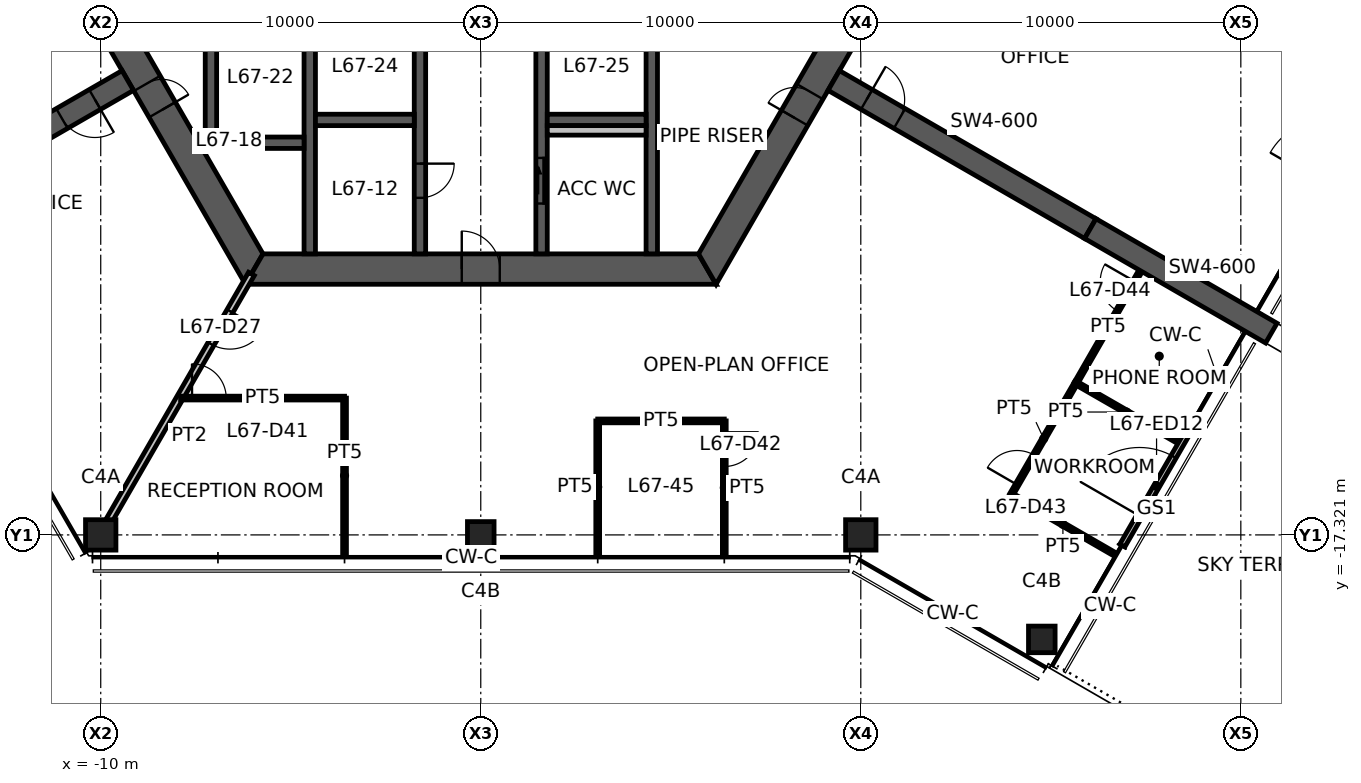
"""IFC4 building model, lengths in metres.
Left out: names, types, materials, properties, quantities, classifications, styles, units other than length and angle.
Written with IfcOpenShell. Run it as: python <this file> out.ifc"""

import sys

from ifc_helpers import new_model, si_unit, direction, frame, frame_2d, origin, origin_2d, place, context, subcontext, project, spatial, polyline, rectangle, hollow_rectangle, outline, extrude, element, fill, save


model = new_model("IFC4")
c1 = context("Model", 3, precision=1e-05, world=origin(), true_north=direction((0.0, 1.0)))
c2 = subcontext(c1, "Body", "Model", "MODEL_VIEW")
j1 = project(units=[si_unit("LENGTHUNIT", "METRE"), si_unit("PLANEANGLEUNIT", "RADIAN")], contexts=[c1])
p1 = place(None, origin())
s1 = spatial("IfcSite", under=j1, at=p1, CompositionType="ELEMENT")
p2 = place(p1, origin())
s2 = spatial("IfcBuilding", under=s1, at=p2, CompositionType="ELEMENT")
p3 = place(p2, frame((0.0, 0.0, 267.4)))
s3 = spatial("IfcBuildingStorey", under=s2, at=p3, CompositionType="ELEMENT", Elevation=267.4)
for number, where, z_axis, x_axis in (
    (1, (-10.0, -17.321, 0.0), (0.0, 0.0, 1.0), (1.0, 0.0, 0.0)),
    (2, (10.0, -17.321, 0.0), (0.0, 0.0, 1.0), (1.0, 0.0, 0.0)),
):
    element("IfcColumn", number, at=place(p3, frame(where, z_axis=z_axis, x_axis=x_axis)), inside=s3, PredefinedType="COLUMN", context=c2, shape_type="SweptSolid", body=[
        extrude(hollow_rectangle(XDim=0.8, YDim=0.8, WallThickness=0.04, at=origin_2d()), origin(), (0.0, 0.0, 1.0), 3.9),
    ])
for number, where, z_axis, x_axis in (
    (3, (0.0, -17.321, 0.0), (0.0, 0.0, 1.0), (1.0, 0.0, 0.0)),
    (4, (14.763, -20.071, 0.0), (0.0, 0.0, 1.0), (1.0, 0.0, 0.0)),
):
    element("IfcColumn", number, at=place(p3, frame(where, z_axis=z_axis, x_axis=x_axis)), inside=s3, PredefinedType="COLUMN", context=c2, shape_type="SweptSolid", body=[
        extrude(hollow_rectangle(XDim=0.7, YDim=0.7, WallThickness=0.032, at=origin_2d()), origin(), (0.0, 0.0, 1.0), 3.9),
    ])
p4 = place(p3, frame((-11.922, 0.0, 0.0), z_axis=(0.0, 0.0, 1.0), x_axis=(0.500004296715, -0.866022923061, 0.0)))
e5 = element("IfcWall", 5, at=p4, inside=s3, PredefinedType="SHEAR", context=c2, shape_type="SweptSolid", body=[
    extrude(outline(polyline([(-0.231, -0.4), (6.281, -0.4), (7.081, -0.4), (12.153, -0.4), (11.691, 0.4), (7.081, 0.4), (6.281, 0.4), (0.231, 0.4), (-0.231, -0.4)])), origin(), (0.0, 0.0, 1.0), 3.9),
])
p5 = place(p4, frame((6.281, 0.0, 0.0)))
e6 = element("IfcOpeningElement", 6, at=p5, cuts=e5, PredefinedType="OPENING", context=c2, shape_type="SweptSolid", body=[
    extrude(rectangle(XDim=0.8, YDim=2.1, at=frame_2d((0.4, 1.05))), frame((0.0, 0.41, 0.0), z_axis=(0.0, -1.0, 0.0), x_axis=(1.0, 0.0, 0.0)), (0.0, 0.0, 1.0), 0.82),
])
p6 = place(p3, frame((-5.961, -10.325, 0.0), z_axis=(0.0, 0.0, 1.0), x_axis=(1.0, 0.0, 0.0)))
e7 = element("IfcWall", 7, at=p6, inside=s3, PredefinedType="SHEAR", context=c2, shape_type="SweptSolid", body=[
    extrude(outline(polyline([(-0.231, -0.4), (5.461, -0.4), (6.461, -0.4), (12.153, -0.4), (11.691, 0.4), (6.461, 0.4), (5.461, 0.4), (0.231, 0.4), (-0.231, -0.4)])), origin(), (0.0, 0.0, 1.0), 3.9),
])
p7 = place(p6, frame((5.461, 0.0, 0.0)))
e8 = element("IfcOpeningElement", 8, at=p7, cuts=e7, PredefinedType="OPENING", context=c2, shape_type="SweptSolid", body=[
    extrude(rectangle(XDim=1.0, YDim=2.1, at=frame_2d((0.5, 1.05))), frame((0.0, 0.41, 0.0), z_axis=(0.0, -1.0, 0.0), x_axis=(1.0, 0.0, 0.0)), (0.0, 0.0, 1.0), 0.82),
])
p8 = place(p3, frame((5.961, -10.325, 0.0), z_axis=(0.0, 0.0, 1.0), x_axis=(0.500004296715, 0.866022923061, 0.0)))
e9 = element("IfcWall", 9, at=p8, inside=s3, PredefinedType="SHEAR", context=c2, shape_type="SweptSolid", body=[
    extrude(outline(polyline([(-0.231, -0.4), (4.594, -0.4), (5.394, -0.4), (12.153, -0.4), (11.691, 0.4), (5.394, 0.4), (4.594, 0.4), (0.231, 0.4), (-0.231, -0.4)])), origin(), (0.0, 0.0, 1.0), 3.9),
])
p9 = place(p8, frame((4.594, 0.0, 0.0)))
e10 = element("IfcOpeningElement", 10, at=p9, cuts=e9, PredefinedType="OPENING", context=c2, shape_type="SweptSolid", body=[
    extrude(rectangle(XDim=0.8, YDim=2.1, at=frame_2d((0.4, 1.05))), frame((0.0, 0.41, 0.0), z_axis=(0.0, -1.0, 0.0), x_axis=(1.0, 0.0, 0.0)), (0.0, 0.0, 1.0), 0.82),
])
p10 = place(p3, frame((-9.288, -5.363, 0.0), z_axis=(0.0, 0.0, 1.0), x_axis=(-0.866027473358, -0.499996415376, 0.0)))
e11 = element("IfcWall", 11, at=p10, inside=s3, PredefinedType="SHEAR", context=c2, shape_type="SweptSolid", body=[
    extrude(rectangle(XDim=7.045, YDim=0.6, at=frame_2d((3.523, 0.0))), origin(), (0.0, 0.0, 1.0), 3.9),
])
p11 = place(p10, frame((1.0, 0.0, 0.0)))
e12 = element("IfcOpeningElement", 12, at=p11, cuts=e11, PredefinedType="OPENING", context=c2, shape_type="SweptSolid", body=[
    extrude(rectangle(XDim=1.0, YDim=2.1, at=frame_2d((0.5, 1.05))), frame((0.0, 0.31, 0.0), z_axis=(0.0, -1.0, 0.0), x_axis=(1.0, 0.0, 0.0)), (0.0, 0.0, 1.0), 0.62),
])
p12 = place(p3, frame((9.288, -5.363, 0.0), z_axis=(0.0, 0.0, 1.0), x_axis=(0.866031736626, -0.499989031036, 0.0)))
e13 = element("IfcWall", 13, at=p12, inside=s3, PredefinedType="SHEAR", context=c2, shape_type="SweptSolid", body=[
    extrude(rectangle(XDim=7.796, YDim=0.6, at=frame_2d((3.898, 0.0))), origin(), (0.0, 0.0, 1.0), 3.9),
])
p13 = place(p12, frame((1.0, 0.0, 0.0)))
e14 = element("IfcOpeningElement", 14, at=p13, cuts=e13, PredefinedType="OPENING", context=c2, shape_type="SweptSolid", body=[
    extrude(rectangle(XDim=1.0, YDim=2.1, at=frame_2d((0.5, 1.05))), frame((0.0, 0.31, 0.0), z_axis=(0.0, -1.0, 0.0), x_axis=(1.0, 0.0, 0.0)), (0.0, 0.0, 1.0), 0.62),
])
p14 = place(p3, frame((16.039, -9.26, 0.0), z_axis=(0.0, 0.0, 1.0), x_axis=(0.866027397988, -0.499996545922, 0.0)))
e15 = element("IfcWall", 15, at=p14, inside=s3, PredefinedType="SHEAR", context=c2, shape_type="SweptSolid", body=[
    extrude(rectangle(XDim=5.5, YDim=0.6, at=frame_2d((2.75, 0.0))), origin(), (0.0, 0.0, 1.0), 3.9),
])
p15 = place(p3, frame((16.883, -17.599, 0.0), z_axis=(0.0, 0.0, 1.0), x_axis=(0.500012057535, 0.866018442252, 0.0)))
e16 = element("IfcWall", 16, at=p15, inside=s3, PredefinedType="STANDARD", context=c2, shape_type="SweptSolid", body=[
    extrude(rectangle(XDim=3.6, YDim=0.15, at=frame_2d((1.8, 0.0))), origin(), (0.0, 0.0, 1.0), 3.9),
])
p16 = place(p15, frame((0.9, 0.0, 0.0)))
e17 = element("IfcOpeningElement", 17, at=p16, cuts=e16, PredefinedType="OPENING", context=c2, shape_type="SweptSolid", body=[
    extrude(rectangle(XDim=1.8, YDim=2.1, at=frame_2d((0.9, 1.05))), frame((0.0, 0.085, 0.0), z_axis=(0.0, -1.0, 0.0), x_axis=(1.0, 0.0, 0.0)), (0.0, 0.0, 1.0), 0.17),
])
p17 = place(p3, frame((-1.6, -3.75, 0.0), z_axis=(0.0, 0.0, 1.0), x_axis=(0.0, -1.0, 0.0)))
e18 = element("IfcWall", 18, at=p17, inside=s3, PredefinedType="SHEAR", context=c2, shape_type="SweptSolid", body=[
    extrude(rectangle(XDim=6.175, YDim=0.3, at=frame_2d((3.087, 0.0))), origin(), (0.0, 0.0, 1.0), 3.9),
])
p18 = place(p17, frame((3.8, 0.0, 0.0)))
e19 = element("IfcOpeningElement", 19, at=p18, cuts=e18, PredefinedType="OPENING", context=c2, shape_type="SweptSolid", body=[
    extrude(rectangle(XDim=0.9, YDim=2.1, at=frame_2d((0.45, 1.05))), frame((0.0, 0.16, 0.0), z_axis=(0.0, -1.0, 0.0), x_axis=(1.0, 0.0, 0.0)), (0.0, 0.0, 1.0), 0.32),
])
p19 = place(p3, frame((1.6, -3.75, 0.0), z_axis=(0.0, 0.0, 1.0), x_axis=(0.0, -1.0, 0.0)))
e20 = element("IfcWall", 20, at=p19, inside=s3, PredefinedType="SHEAR", context=c2, shape_type="SweptSolid", body=[
    extrude(rectangle(XDim=6.175, YDim=0.3, at=frame_2d((3.087, 0.0))), origin(), (0.0, 0.0, 1.0), 3.9),
])
p20 = place(p19, frame((3.65, 0.0, 0.0)))
e21 = element("IfcOpeningElement", 21, at=p20, cuts=e20, PredefinedType="OPENING", context=c2, shape_type="SweptSolid", body=[
    extrude(rectangle(XDim=1.2, YDim=2.1, at=frame_2d((0.6, 1.05))), frame((0.0, 0.16, 0.0), z_axis=(0.0, -1.0, 0.0), x_axis=(1.0, 0.0, 0.0)), (0.0, 0.0, 1.0), 0.32),
])
for number, where, z_axis, x_axis in (
    (22, (-4.5, -3.75, 0.0), (0.0, 0.0, 1.0), (0.0, -1.0, 0.0)),
    (23, (4.5, -3.75, 0.0), (0.0, 0.0, 1.0), (0.0, -1.0, 0.0)),
):
    element("IfcWall", number, at=place(p3, frame(where, z_axis=z_axis, x_axis=x_axis)), inside=s3, PredefinedType="SHEAR", context=c2, shape_type="SweptSolid", body=[
        extrude(rectangle(XDim=6.175, YDim=0.3, at=frame_2d((3.087, 0.0))), origin(), (0.0, 0.0, 1.0), 3.9),
    ])
for number, where, z_axis, x_axis in (
    (24, (-4.35, -6.4, 0.0), (0.0, 0.0, 1.0), (1.0, 0.0, 0.0)),
    (25, (1.75, -6.4, 0.0), (0.0, 0.0, 1.0), (1.0, 0.0, 0.0)),
    (26, (-7.25, -7.0, 0.0), (0.0, 0.0, 1.0), (1.0, 0.0, 0.0)),
):
    element("IfcWall", number, at=place(p3, frame(where, z_axis=z_axis, x_axis=x_axis)), inside=s3, PredefinedType="SHEAR", context=c2, shape_type="SweptSolid", body=[
        extrude(rectangle(XDim=2.6, YDim=0.3, at=frame_2d((1.3, 0.0))), origin(), (0.0, 0.0, 1.0), 3.9),
    ])
p21 = place(p3, frame((-7.1, -3.75, 0.0), z_axis=(0.0, 0.0, 1.0), x_axis=(0.0, -1.0, 0.0)))
e27 = element("IfcWall", 27, at=p21, inside=s3, PredefinedType="SHEAR", context=c2, shape_type="SweptSolid", body=[
    extrude(rectangle(XDim=3.1, YDim=0.3, at=frame_2d((1.55, 0.0))), origin(), (0.0, 0.0, 1.0), 3.9),
])
p22 = place(p3, frame((1.75, -6.675, 0.0), z_axis=(0.0, 0.0, 1.0), x_axis=(1.0, 0.0, 0.0)))
e28 = element("IfcWall", 28, at=p22, inside=s3, PredefinedType="PLUMBINGWALL", context=c2, shape_type="SweptSolid", body=[
    extrude(rectangle(XDim=2.6, YDim=0.25, at=frame_2d((1.3, 0.0))), origin(), (0.0, 0.0, 1.0), 3.9),
])
p23 = place(p3, frame((-6.035, -10.453, 0.0), z_axis=(0.0, 0.0, 1.0), x_axis=(-0.499989830942, -0.866031274813, 0.0)))
e29 = element("IfcWall", 29, at=p23, inside=s3, PredefinedType="PARTITIONING", context=c2, shape_type="SweptSolid", body=[
    extrude(rectangle(XDim=7.93, YDim=0.175, at=frame_2d((3.965, 0.0))), origin(), (0.0, 0.0, 1.0), 3.05),
])
p24 = place(p23, frame((1.13, 0.0, 0.0)))
e30 = element("IfcOpeningElement", 30, at=p24, cuts=e29, PredefinedType="OPENING", context=c2, shape_type="SweptSolid", body=[
    extrude(rectangle(XDim=1.0, YDim=2.1, at=frame_2d((0.5, 1.05))), frame((0.0, 0.098, 0.0), z_axis=(0.0, -1.0, 0.0), x_axis=(1.0, 0.0, 0.0)), (0.0, 0.0, 1.0), 0.195),
])
p25 = place(p3, frame((-7.898, -13.719, 0.0), z_axis=(0.0, 0.0, 1.0), x_axis=(0.999999974372, -0.000226398002, 0.0)))
e31 = element("IfcWall", 31, at=p25, inside=s3, PredefinedType="PARTITIONING", context=c2, shape_type="SweptSolid", body=[
    extrude(rectangle(XDim=4.313, YDim=0.1, at=frame_2d((2.157, 0.0))), origin(), (0.0, 0.0, 1.0), 2.95),
])
p26 = place(p25, frame((0.3, 0.0, 0.0)))
e32 = element("IfcOpeningElement", 32, at=p26, cuts=e31, PredefinedType="OPENING", context=c2, shape_type="SweptSolid", body=[
    extrude(rectangle(XDim=0.9, YDim=2.1, at=frame_2d((0.45, 1.05))), frame((0.0, 0.06, 0.0), z_axis=(0.0, -1.0, 0.0), x_axis=(1.0, 0.0, 0.0)), (0.0, 0.0, 1.0), 0.12),
])
p27 = place(p3, frame((-3.584, -13.72, 0.0), z_axis=(0.0, 0.0, 1.0), x_axis=(0.0, -1.0, 0.0)))
e33 = element("IfcWall", 33, at=p27, inside=s3, PredefinedType="PARTITIONING", context=c2, shape_type="SweptSolid", body=[
    extrude(rectangle(XDim=4.08, YDim=0.1, at=frame_2d((2.04, 0.0))), origin(), (0.0, 0.0, 1.0), 2.95),
])
p28 = place(p3, frame((3.077, -17.801, 0.0), z_axis=(0.0, 0.0, 1.0), x_axis=(0.0, 1.0, 0.0)))
e34 = element("IfcWall", 34, at=p28, inside=s3, PredefinedType="PARTITIONING", context=c2, shape_type="SweptSolid", body=[
    extrude(rectangle(XDim=3.48, YDim=0.1, at=frame_2d((1.74, 0.0))), origin(), (0.0, 0.0, 1.0), 2.95),
])
p29 = place(p3, frame((3.077, -14.321, 0.0), z_axis=(0.0, 0.0, 1.0), x_axis=(1.0, 0.0, 0.0)))
e35 = element("IfcWall", 35, at=p29, inside=s3, PredefinedType="PARTITIONING", context=c2, shape_type="SweptSolid", body=[
    extrude(rectangle(XDim=3.331, YDim=0.1, at=frame_2d((1.666, 0.0))), origin(), (0.0, 0.0, 1.0), 2.95),
])
p30 = place(p3, frame((6.408, -14.321, 0.0), z_axis=(0.0, 0.0, 1.0), x_axis=(0.0, -1.0, 0.0)))
e36 = element("IfcWall", 36, at=p30, inside=s3, PredefinedType="PARTITIONING", context=c2, shape_type="SweptSolid", body=[
    extrude(rectangle(XDim=3.515, YDim=0.1, at=frame_2d((1.757, 0.0))), origin(), (0.0, 0.0, 1.0), 2.95),
])
p31 = place(p30, frame((0.3, 0.0, 0.0)))
e37 = element("IfcOpeningElement", 37, at=p31, cuts=e36, PredefinedType="OPENING", context=c2, shape_type="SweptSolid", body=[
    extrude(rectangle(XDim=0.9, YDim=2.1, at=frame_2d((0.45, 1.05))), frame((0.0, 0.06, 0.0), z_axis=(0.0, -1.0, 0.0), x_axis=(1.0, 0.0, 0.0)), (0.0, 0.0, 1.0), 0.12),
])
p32 = place(p3, frame((15.659, -13.319, 0.0), z_axis=(0.0, 0.0, 1.0), x_axis=(0.866844641549, -0.498578346319, 0.0)))
e38 = element("IfcWall", 38, at=p32, inside=s3, PredefinedType="PARTITIONING", context=c2, shape_type="SweptSolid", body=[
    extrude(rectangle(XDim=3.08, YDim=0.1, at=frame_2d((1.54, 0.0))), origin(), (0.0, 0.0, 1.0), 2.95),
])
p33 = place(p3, frame((13.961, -16.259, 0.0), z_axis=(0.0, 0.0, 1.0), x_axis=(0.501149490816, 0.865360727012, 0.0)))
e39 = element("IfcWall", 39, at=p33, inside=s3, PredefinedType="PARTITIONING", context=c2, shape_type="SweptSolid", body=[
    extrude(rectangle(XDim=3.4, YDim=0.1, at=frame_2d((1.7, 0.0))), origin(), (0.0, 0.0, 1.0), 2.95),
])
p34 = place(p33, frame((0.3, 0.0, 0.0)))
e40 = element("IfcOpeningElement", 40, at=p34, cuts=e39, PredefinedType="OPENING", context=c2, shape_type="SweptSolid", body=[
    extrude(rectangle(XDim=0.9, YDim=2.1, at=frame_2d((0.45, 1.05))), frame((0.0, 0.06, 0.0), z_axis=(0.0, -1.0, 0.0), x_axis=(1.0, 0.0, 0.0)), (0.0, 0.0, 1.0), 0.12),
])
p35 = place(p3, frame((16.676, -17.826, 0.0), z_axis=(0.0, 0.0, 1.0), x_axis=(-0.866038995786, 0.499976457224, 0.0)))
e41 = element("IfcWall", 41, at=p35, inside=s3, PredefinedType="PARTITIONING", context=c2, shape_type="SweptSolid", body=[
    extrude(rectangle(XDim=3.134, YDim=0.1, at=frame_2d((1.567, 0.0))), origin(), (0.0, 0.0, 1.0), 2.95),
])
p36 = place(p3, frame((15.665, -13.317, 0.0), z_axis=(0.0, 0.0, 1.0), x_axis=(0.498882251571, 0.866669775098, 0.0)))
e42 = element("IfcWall", 42, at=p36, inside=s3, PredefinedType="PARTITIONING", context=c2, shape_type="SweptSolid", body=[
    extrude(rectangle(XDim=3.38, YDim=0.1, at=frame_2d((1.69, 0.0))), origin(), (0.0, 0.0, 1.0), 2.95),
])
p37 = place(p36, frame((2.18, 0.0, 0.0)))
e43 = element("IfcOpeningElement", 43, at=p37, cuts=e42, PredefinedType="OPENING", context=c2, shape_type="SweptSolid", body=[
    extrude(rectangle(XDim=0.9, YDim=2.1, at=frame_2d((0.45, 1.05))), frame((0.0, 0.06, 0.0), z_axis=(0.0, -1.0, 0.0), x_axis=(1.0, 0.0, 0.0)), (0.0, 0.0, 1.0), 0.12),
])
p38 = place(p16, origin())
e44 = element("IfcDoor", 44, at=p38, inside=s3, OperationType="DOUBLE_DOOR_SINGLE_SWING", PredefinedType="DOOR", context=c2, shape_type="SweptSolid", body=[
    extrude(rectangle(XDim=1.8, YDim=2.1, at=frame_2d((0.9, 1.05))), frame((0.0, 0.025, 0.0), z_axis=(0.0, -1.0, 0.0), x_axis=(1.0, 0.0, 0.0)), (0.0, 0.0, 1.0), 0.05),
])
fill(e17, e44)
p39 = place(p7, origin())
e45 = element("IfcDoor", 45, at=p39, inside=s3, OperationType="SINGLE_SWING_LEFT", PredefinedType="DOOR", context=c2, shape_type="SweptSolid", body=[
    extrude(rectangle(XDim=1.0, YDim=2.1, at=frame_2d((0.5, 1.05))), frame((0.0, 0.025, 0.0), z_axis=(0.0, -1.0, 0.0), x_axis=(1.0, 0.0, 0.0)), (0.0, 0.0, 1.0), 0.05),
])
fill(e8, e45)
p40 = place(p9, origin())
e46 = element("IfcDoor", 46, at=p40, inside=s3, OperationType="SINGLE_SWING_LEFT", PredefinedType="DOOR", context=c2, shape_type="SweptSolid", body=[
    extrude(rectangle(XDim=0.8, YDim=2.1, at=frame_2d((0.4, 1.05))), frame((0.0, 0.025, 0.0), z_axis=(0.0, -1.0, 0.0), x_axis=(1.0, 0.0, 0.0)), (0.0, 0.0, 1.0), 0.05),
])
fill(e10, e46)
p41 = place(p5, origin())
e47 = element("IfcDoor", 47, at=p41, inside=s3, OperationType="SINGLE_SWING_RIGHT", PredefinedType="DOOR", context=c2, shape_type="SweptSolid", body=[
    extrude(rectangle(XDim=0.8, YDim=2.1, at=frame_2d((0.4, 1.05))), frame((0.0, 0.025, 0.0), z_axis=(0.0, -1.0, 0.0), x_axis=(1.0, 0.0, 0.0)), (0.0, 0.0, 1.0), 0.05),
])
fill(e6, e47)
p42 = place(p20, origin())
e48 = element("IfcDoor", 48, at=p42, inside=s3, OperationType="SLIDING_TO_LEFT", PredefinedType="DOOR", context=c2, shape_type="SweptSolid", body=[
    extrude(rectangle(XDim=1.2, YDim=2.1, at=frame_2d((0.6, 1.05))), frame((0.0, 0.025, 0.0), z_axis=(0.0, -1.0, 0.0), x_axis=(1.0, 0.0, 0.0)), (0.0, 0.0, 1.0), 0.05),
])
fill(e21, e48)
p43 = place(p18, origin())
e49 = element("IfcDoor", 49, at=p43, inside=s3, OperationType="SINGLE_SWING_LEFT", PredefinedType="DOOR", context=c2, shape_type="SweptSolid", body=[
    extrude(rectangle(XDim=0.9, YDim=2.1, at=frame_2d((0.45, 1.05))), frame((0.0, 0.025, 0.0), z_axis=(0.0, -1.0, 0.0), x_axis=(1.0, 0.0, 0.0)), (0.0, 0.0, 1.0), 0.05),
])
fill(e19, e49)
p44 = place(p11, origin())
e50 = element("IfcDoor", 50, at=p44, inside=s3, OperationType="SINGLE_SWING_LEFT", PredefinedType="DOOR", context=c2, shape_type="SweptSolid", body=[
    extrude(rectangle(XDim=1.0, YDim=2.1, at=frame_2d((0.5, 1.05))), frame((0.0, 0.025, 0.0), z_axis=(0.0, -1.0, 0.0), x_axis=(1.0, 0.0, 0.0)), (0.0, 0.0, 1.0), 0.05),
])
fill(e12, e50)
p45 = place(p13, origin())
e51 = element("IfcDoor", 51, at=p45, inside=s3, OperationType="SINGLE_SWING_LEFT", PredefinedType="DOOR", context=c2, shape_type="SweptSolid", body=[
    extrude(rectangle(XDim=1.0, YDim=2.1, at=frame_2d((0.5, 1.05))), frame((0.0, 0.025, 0.0), z_axis=(0.0, -1.0, 0.0), x_axis=(1.0, 0.0, 0.0)), (0.0, 0.0, 1.0), 0.05),
])
fill(e14, e51)
p46 = place(p24, origin())
e52 = element("IfcDoor", 52, at=p46, inside=s3, OperationType="SINGLE_SWING_LEFT", PredefinedType="DOOR", context=c2, shape_type="SweptSolid", body=[
    extrude(rectangle(XDim=1.0, YDim=2.1, at=frame_2d((0.5, 1.05))), frame((0.0, 0.025, 0.0), z_axis=(0.0, -1.0, 0.0), x_axis=(1.0, 0.0, 0.0)), (0.0, 0.0, 1.0), 0.05),
])
fill(e30, e52)
p47 = place(p26, origin())
e53 = element("IfcDoor", 53, at=p47, inside=s3, OperationType="SINGLE_SWING_LEFT", PredefinedType="DOOR", context=c2, shape_type="SweptSolid", body=[
    extrude(rectangle(XDim=0.9, YDim=2.1, at=frame_2d((0.45, 1.05))), frame((0.0, 0.025, 0.0), z_axis=(0.0, -1.0, 0.0), x_axis=(1.0, 0.0, 0.0)), (0.0, 0.0, 1.0), 0.05),
])
fill(e32, e53)
p48 = place(p31, origin())
e54 = element("IfcDoor", 54, at=p48, inside=s3, OperationType="SINGLE_SWING_LEFT", PredefinedType="DOOR", context=c2, shape_type="SweptSolid", body=[
    extrude(rectangle(XDim=0.9, YDim=2.1, at=frame_2d((0.45, 1.05))), frame((0.0, 0.025, 0.0), z_axis=(0.0, -1.0, 0.0), x_axis=(1.0, 0.0, 0.0)), (0.0, 0.0, 1.0), 0.05),
])
fill(e37, e54)
p49 = place(p34, origin())
e55 = element("IfcDoor", 55, at=p49, inside=s3, OperationType="SINGLE_SWING_LEFT", PredefinedType="DOOR", context=c2, shape_type="SweptSolid", body=[
    extrude(rectangle(XDim=0.9, YDim=2.1, at=frame_2d((0.45, 1.05))), frame((0.0, 0.025, 0.0), z_axis=(0.0, -1.0, 0.0), x_axis=(1.0, 0.0, 0.0)), (0.0, 0.0, 1.0), 0.05),
])
fill(e40, e55)
p50 = place(p37, origin())
e56 = element("IfcDoor", 56, at=p50, inside=s3, OperationType="SINGLE_SWING_RIGHT", PredefinedType="DOOR", context=c2, shape_type="SweptSolid", body=[
    extrude(rectangle(XDim=0.9, YDim=2.1, at=frame_2d((0.45, 1.05))), frame((0.0, 0.025, 0.0), z_axis=(0.0, -1.0, 0.0), x_axis=(1.0, 0.0, 0.0)), (0.0, 0.0, 1.0), 0.05),
])
fill(e43, e56)
save(model, sys.argv[1])
